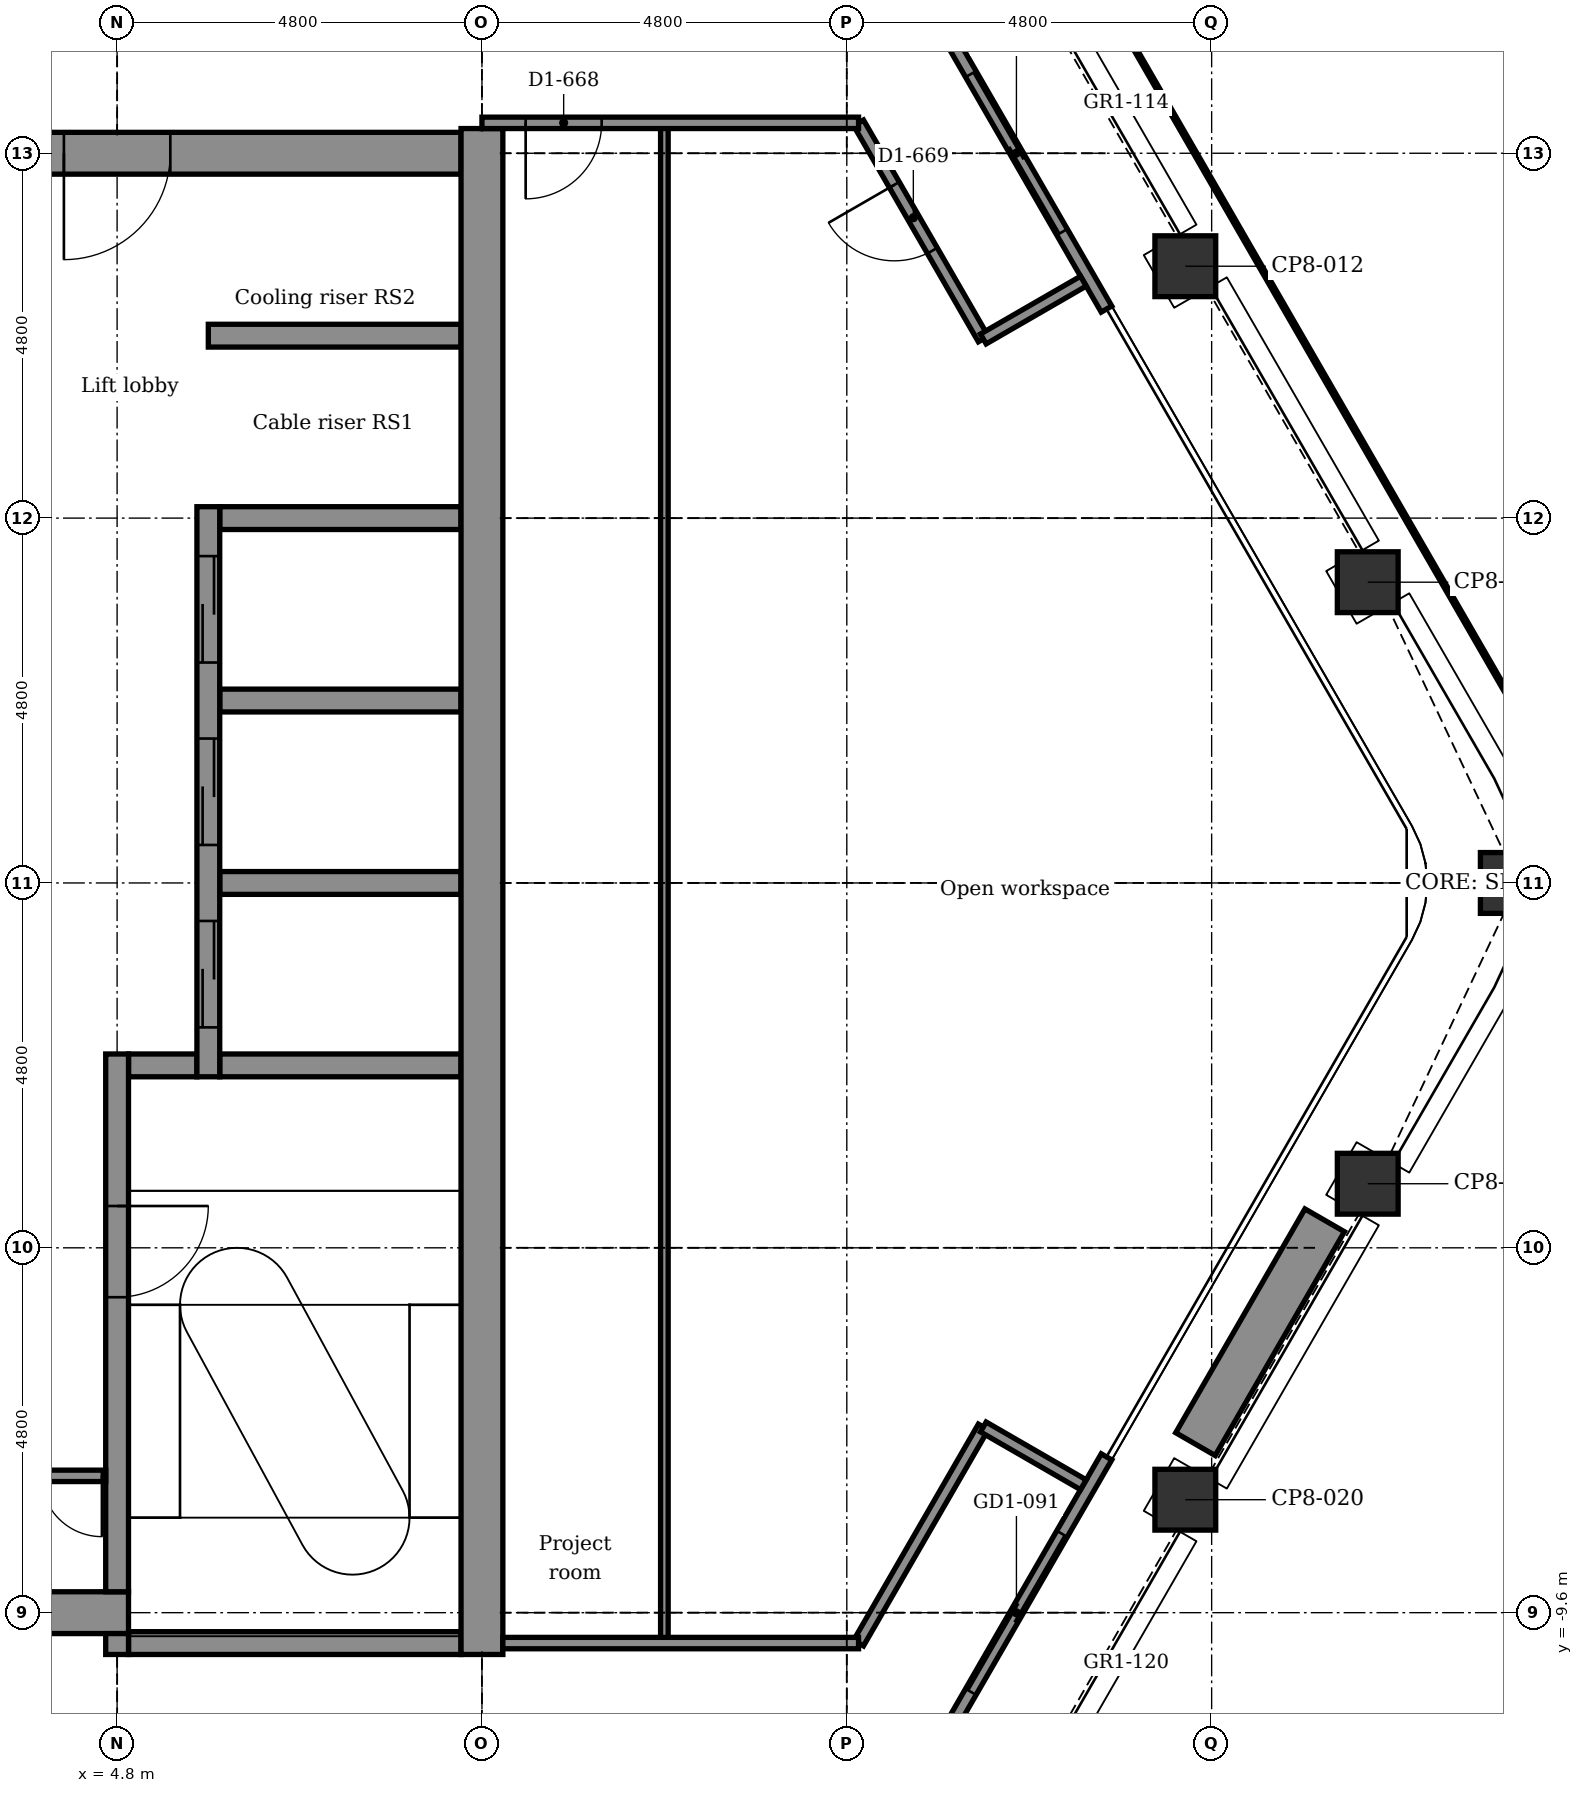
"""IFC4 building model, lengths in metres.
Left out: names, types, materials, properties, quantities, classifications, styles, units other than length and angle.
Written with IfcOpenShell. Run it as: python <this file> out.ifc"""

import sys

from ifc_helpers import new_model, si_unit, direction, frame, frame_2d, origin, origin_2d, place, context, subcontext, project, spatial, rectangle, extrude, element, fill, save


model = new_model("IFC4")
c1 = context("Model", 3, precision=1e-05, world=origin(), true_north=direction((0.0, 1.0)))
c2 = subcontext(c1, "Body", "Model", "MODEL_VIEW")
j1 = project(units=[si_unit("LENGTHUNIT", "METRE"), si_unit("PLANEANGLEUNIT", "RADIAN")], contexts=[c1])
p1 = place(None, origin())
s1 = spatial("IfcSite", under=j1, at=p1, CompositionType="ELEMENT")
p2 = place(p1, origin())
s2 = spatial("IfcBuilding", under=s1, at=p2, CompositionType="ELEMENT")
p3 = place(p2, frame((0.0, 0.0, 238.4)))
s3 = spatial("IfcBuildingStorey", under=s2, at=p3, CompositionType="ELEMENT", Elevation=238.4)
for number, where, z_axis, x_axis in (
    (1, (18.854, 8.114, -0.15), (0.0, 0.0, 1.0), (0.866, 0.5, 0.0)),
    (2, (21.254, 3.957, -0.15), (0.0, 0.0, 1.0), (0.866, 0.5, 0.0)),
    (3, (23.136, 0.0, -0.15), (0.0, 0.0, 1.0), (1.0, 0.0, 0.0)),
    (4, (21.254, -3.957, -0.15), (0.0, 0.0, 1.0), (0.5, 0.866, 0.0)),
    (5, (18.854, -8.114, -0.15), (0.0, 0.0, 1.0), (0.5, 0.866, 0.0)),
):
    element("IfcColumn", number, at=place(p3, frame(where, z_axis=z_axis, x_axis=x_axis)), inside=s3, PredefinedType="COLUMN", context=c2, shape_type="SweptSolid", body=[
        extrude(rectangle(XDim=0.8, YDim=0.8, at=origin_2d()), origin(), (0.0, 0.0, 1.0), 3.9),
    ])
p4 = place(p3, frame((4.95, -10.0, -0.15), z_axis=(0.0, 0.0, 1.0), x_axis=(1.0, 0.0, 0.0)))
e6 = element("IfcWall", 6, at=p4, inside=s3, PredefinedType="STANDARD", context=c2, shape_type="SweptSolid", body=[
    extrude(rectangle(XDim=4.375, YDim=0.3, at=frame_2d((2.188, 0.0))), origin(), (0.0, 0.0, 1.0), 3.9),
])
p5 = place(p3, frame((-5.25, -9.6, -0.15), z_axis=(0.0, 0.0, 1.0), x_axis=(1.0, 0.0, 0.0)))
e7 = element("IfcWall", 7, at=p5, inside=s3, PredefinedType="SHEAR", context=c2, shape_type="SweptSolid", body=[
    extrude(rectangle(XDim=10.2, YDim=0.55, at=frame_2d((5.1, 0.0))), origin(), (0.0, 0.0, 1.0), 3.9),
])
p6 = place(p5, frame((0.6, 0.0, 0.15)))
e8 = element("IfcOpeningElement", 8, at=p6, cuts=e7, PredefinedType="OPENING", context=c2, shape_type="SweptSolid", body=[
    extrude(rectangle(XDim=0.9, YDim=2.1, at=frame_2d((0.45, 1.05))), frame((0.0, 0.285, 0.0), z_axis=(0.0, -1.0, 0.0), x_axis=(1.0, 0.0, 0.0)), (0.0, 0.0, 1.0), 0.57),
])
p7 = place(p3, frame((4.95, -2.4, -0.15), z_axis=(0.0, 0.0, 1.0), x_axis=(1.0, 0.0, 0.0)))
e9 = element("IfcWall", 9, at=p7, inside=s3, PredefinedType="STANDARD", context=c2, shape_type="SweptSolid", body=[
    extrude(rectangle(XDim=0.9, YDim=0.3, at=frame_2d((0.45, 0.0))), origin(), (0.0, 0.0, 1.0), 3.9),
])
for number, where, z_axis, x_axis in (
    (10, (6.15, -2.4, -0.15), (0.0, 0.0, 1.0), (1.0, 0.0, 0.0)),
    (11, (6.15, 0.0, -0.15), (0.0, 0.0, 1.0), (1.0, 0.0, 0.0)),
    (12, (6.15, 2.4, -0.15), (0.0, 0.0, 1.0), (1.0, 0.0, 0.0)),
    (13, (6.15, 4.8, -0.15), (0.0, 0.0, 1.0), (1.0, 0.0, 0.0)),
):
    element("IfcWall", number, at=place(p3, frame(where, z_axis=z_axis, x_axis=x_axis)), inside=s3, PredefinedType="STANDARD", context=c2, shape_type="SweptSolid", body=[
        extrude(rectangle(XDim=3.175, YDim=0.3, at=frame_2d((1.587, 0.0))), origin(), (0.0, 0.0, 1.0), 3.9),
    ])
p8 = place(p3, frame((6.0, 7.2, -0.15), z_axis=(0.0, 0.0, 1.0), x_axis=(1.0, 0.0, 0.0)))
e14 = element("IfcWall", 14, at=p8, inside=s3, PredefinedType="STANDARD", context=c2, shape_type="SweptSolid", body=[
    extrude(rectangle(XDim=3.325, YDim=0.3, at=frame_2d((1.663, 0.0))), origin(), (0.0, 0.0, 1.0), 3.9),
])
p9 = place(p3, frame((-5.25, 9.6, -0.15), z_axis=(0.0, 0.0, 1.0), x_axis=(1.0, 0.0, 0.0)))
e15 = element("IfcWall", 15, at=p9, inside=s3, PredefinedType="SHEAR", context=c2, shape_type="SweptSolid", body=[
    extrude(rectangle(XDim=14.575, YDim=0.55, at=frame_2d((7.288, 0.0))), origin(), (0.0, 0.0, 1.0), 3.9),
])
p10 = place(p9, frame((9.35, 0.0, 0.15)))
e16 = element("IfcOpeningElement", 16, at=p10, cuts=e15, PredefinedType="OPENING", context=c2, shape_type="SweptSolid", body=[
    extrude(rectangle(XDim=1.4, YDim=2.1, at=frame_2d((0.7, 1.05))), frame((0.0, 0.285, 0.0), z_axis=(0.0, -1.0, 0.0), x_axis=(1.0, 0.0, 0.0)), (0.0, 0.0, 1.0), 0.57),
])
p11 = place(p3, frame((4.8, -10.15, -0.15), z_axis=(0.0, 0.0, 1.0), x_axis=(0.0, 1.0, 0.0)))
e17 = element("IfcWall", 17, at=p11, inside=s3, PredefinedType="STANDARD", context=c2, shape_type="SweptSolid", body=[
    extrude(rectangle(XDim=0.275, YDim=0.3, at=frame_2d((0.137, 0.0))), origin(), (0.0, 0.0, 1.0), 3.9),
])
p12 = place(p3, frame((4.8, -9.325, -0.15), z_axis=(0.0, 0.0, 1.0), x_axis=(0.0, 1.0, 0.0)))
e18 = element("IfcWall", 18, at=p12, inside=s3, PredefinedType="STANDARD", context=c2, shape_type="SweptSolid", body=[
    extrude(rectangle(XDim=7.075, YDim=0.3, at=frame_2d((3.538, 0.0))), origin(), (0.0, 0.0, 1.0), 3.9),
])
p13 = place(p12, frame((3.875, 0.0, 0.15)))
e19 = element("IfcOpeningElement", 19, at=p13, cuts=e18, PredefinedType="OPENING", context=c2, shape_type="SweptSolid", body=[
    extrude(rectangle(XDim=1.2, YDim=2.1, at=frame_2d((0.6, 1.05))), frame((0.0, 0.16, 0.0), z_axis=(0.0, -1.0, 0.0), x_axis=(1.0, 0.0, 0.0)), (0.0, 0.0, 1.0), 0.32),
])
p14 = place(p3, frame((6.0, -2.55, -0.15), z_axis=(0.0, 0.0, 1.0), x_axis=(0.0, 1.0, 0.0)))
e20 = element("IfcWall", 20, at=p14, inside=s3, PredefinedType="STANDARD", context=c2, shape_type="SweptSolid", body=[
    extrude(rectangle(XDim=7.5, YDim=0.3, at=frame_2d((3.75, 0.0))), origin(), (0.0, 0.0, 1.0), 3.9),
])
p15 = place(p14, frame((0.65, 0.0, 0.15)))
e21 = element("IfcOpeningElement", 21, at=p15, cuts=e20, PredefinedType="OPENING", context=c2, shape_type="SweptSolid", body=[
    extrude(rectangle(XDim=1.4, YDim=2.1, at=frame_2d((0.7, 1.05))), frame((0.0, 0.16, 0.0), z_axis=(0.0, -1.0, 0.0), x_axis=(1.0, 0.0, 0.0)), (0.0, 0.0, 1.0), 0.32),
])
p16 = place(p14, frame((3.05, 0.0, 0.15)))
e22 = element("IfcOpeningElement", 22, at=p16, cuts=e20, PredefinedType="OPENING", context=c2, shape_type="SweptSolid", body=[
    extrude(rectangle(XDim=1.4, YDim=2.1, at=frame_2d((0.7, 1.05))), frame((0.0, 0.16, 0.0), z_axis=(0.0, -1.0, 0.0), x_axis=(1.0, 0.0, 0.0)), (0.0, 0.0, 1.0), 0.32),
])
p17 = place(p14, frame((5.45, 0.0, 0.15)))
e23 = element("IfcOpeningElement", 23, at=p17, cuts=e20, PredefinedType="OPENING", context=c2, shape_type="SweptSolid", body=[
    extrude(rectangle(XDim=1.4, YDim=2.1, at=frame_2d((0.7, 1.05))), frame((0.0, 0.16, 0.0), z_axis=(0.0, -1.0, 0.0), x_axis=(1.0, 0.0, 0.0)), (0.0, 0.0, 1.0), 0.32),
])
p18 = place(p3, frame((9.6, -10.15, -0.15), z_axis=(0.0, 0.0, 1.0), x_axis=(0.0, 1.0, 0.0)))
e24 = element("IfcWall", 24, at=p18, inside=s3, PredefinedType="SHEAR", context=c2, shape_type="SweptSolid", body=[
    extrude(rectangle(XDim=20.075, YDim=0.55, at=frame_2d((10.038, 0.0))), origin(), (0.0, 0.0, 1.0), 3.9),
])
p19 = place(p3, frame((15.447, 11.655, 0.0), z_axis=(0.0, 0.0, 1.0), x_axis=(0.499978080042, -0.866038058908, 0.0)))
e25 = element("IfcWall", 25, at=p19, inside=s3, PredefinedType="PARTITIONING", context=c2, shape_type="SweptSolid", body=[
    extrude(rectangle(XDim=4.74, YDim=0.16, at=frame_2d((2.37, 0.0))), origin(), (0.0, 0.0, 1.0), 3.75),
])
p20 = place(p19, frame((1.17, 0.0, 0.0)))
e26 = element("IfcOpeningElement", 26, at=p20, cuts=e25, PredefinedType="OPENING", context=c2, shape_type="SweptSolid", body=[
    extrude(rectangle(XDim=2.4, YDim=2.4, at=frame_2d((1.2, 1.2))), frame((0.0, 0.09, 0.0), z_axis=(0.0, -1.0, 0.0), x_axis=(1.0, 0.0, 0.0)), (0.0, 0.0, 1.0), 0.18),
])
p21 = place(p3, frame((17.817, -7.55, 0.0), z_axis=(0.0, 0.0, 1.0), x_axis=(-0.499978080042, -0.866038058908, 0.0)))
e27 = element("IfcWall", 27, at=p21, inside=s3, PredefinedType="PARTITIONING", context=c2, shape_type="SweptSolid", body=[
    extrude(rectangle(XDim=4.74, YDim=0.16, at=frame_2d((2.37, 0.0))), origin(), (0.0, 0.0, 1.0), 3.75),
])
p22 = place(p21, frame((1.17, 0.0, 0.0)))
e28 = element("IfcOpeningElement", 28, at=p22, cuts=e27, PredefinedType="OPENING", context=c2, shape_type="SweptSolid", body=[
    extrude(rectangle(XDim=2.4, YDim=2.4, at=frame_2d((1.2, 1.2))), frame((0.0, 0.09, 0.0), z_axis=(0.0, -1.0, 0.0), x_axis=(1.0, 0.0, 0.0)), (0.0, 0.0, 1.0), 0.18),
])
p23 = place(p3, frame((20.687, -4.438, 0.0), z_axis=(0.0, 0.0, 1.0), x_axis=(-0.500008388397, -0.866020560687, 0.0)))
e29 = element("IfcWall", 29, at=p23, inside=s3, PredefinedType="USERDEFINED", context=c2, shape_type="SweptSolid", body=[
    extrude(rectangle(XDim=3.4, YDim=0.6, at=frame_2d((1.7, 0.0))), origin(), (0.0, 0.0, 1.0), 0.7),
])
p24 = place(p3, frame((12.0, -10.0, 0.0), z_axis=(0.0, 0.0, 1.0), x_axis=(0.0, 1.0, 0.0)))
e30 = element("IfcWall", 30, at=p24, inside=s3, PredefinedType="PARTITIONING", context=c2, shape_type="SweptSolid", body=[
    extrude(rectangle(XDim=20.0, YDim=0.1, at=frame_2d((10.0, 0.0))), origin(), (0.0, 0.0, 1.0), 3.75),
])
p25 = place(p3, frame((14.555, 10.0, 0.0), z_axis=(0.0, 0.0, 1.0), x_axis=(0.499954196102, -0.866051847062, 0.0)))
e31 = element("IfcWall", 31, at=p25, inside=s3, PredefinedType="PARTITIONING", context=c2, shape_type="SweptSolid", body=[
    extrude(rectangle(XDim=3.283, YDim=0.15, at=frame_2d((1.642, 0.0))), origin(), (0.0, 0.0, 1.0), 3.75),
])
p26 = place(p25, frame((0.941, 0.0, 0.0)))
e32 = element("IfcOpeningElement", 32, at=p26, cuts=e31, PredefinedType="OPENING", context=c2, shape_type="SweptSolid", body=[
    extrude(rectangle(XDim=1.0, YDim=2.1, at=frame_2d((0.5, 1.05))), frame((0.0, 0.085, 0.0), z_axis=(0.0, -1.0, 0.0), x_axis=(1.0, 0.0, 0.0)), (0.0, 0.0, 1.0), 0.17),
])
p27 = place(p3, frame((14.555, -10.0, 0.0), z_axis=(0.0, 0.0, 1.0), x_axis=(0.499954196102, 0.866051847062, 0.0)))
e33 = element("IfcWall", 33, at=p27, inside=s3, PredefinedType="PARTITIONING", context=c2, shape_type="SweptSolid", body=[
    extrude(rectangle(XDim=3.283, YDim=0.15, at=frame_2d((1.642, 0.0))), origin(), (0.0, 0.0, 1.0), 3.75),
])
for number, where, z_axis, x_axis in (
    (34, (16.196, -7.157, 0.0), (0.0, 0.0, 1.0), (0.866, -0.5, 0.0)),
    (35, (16.196, 7.157, 0.0), (0.0, 0.0, 1.0), (0.866, 0.5, 0.0)),
):
    element("IfcWall", number, at=place(p3, frame(where, z_axis=z_axis, x_axis=x_axis)), inside=s3, PredefinedType="PARTITIONING", context=c2, shape_type="SweptSolid", body=[
        extrude(rectangle(XDim=1.52, YDim=0.15, at=frame_2d((0.76, 0.0))), origin(), (0.0, 0.0, 1.0), 3.75),
    ])
p28 = place(p3, frame((9.875, -10.0, 0.0), z_axis=(0.0, 0.0, 1.0), x_axis=(1.0, 0.0, 0.0)))
e36 = element("IfcWall", 36, at=p28, inside=s3, PredefinedType="PARTITIONING", context=c2, shape_type="SweptSolid", body=[
    extrude(rectangle(XDim=4.68, YDim=0.15, at=frame_2d((2.34, 0.0))), origin(), (0.0, 0.0, 1.0), 3.75),
])
p29 = place(p3, frame((3.75, -7.8, 0.0), z_axis=(0.0, 0.0, 1.0), x_axis=(1.0, 0.0, 0.0)))
e37 = element("IfcWall", 37, at=p29, inside=s3, PredefinedType="PARTITIONING", context=c2, shape_type="SweptSolid", body=[
    extrude(rectangle(XDim=0.9, YDim=0.15, at=frame_2d((0.45, 0.0))), origin(), (0.0, 0.0, 1.0), 3.75),
])
p30 = place(p29, frame((0.05, 0.0, 0.0)))
e38 = element("IfcOpeningElement", 38, at=p30, cuts=e37, PredefinedType="OPENING", context=c2, shape_type="SweptSolid", body=[
    extrude(rectangle(XDim=0.8, YDim=2.1, at=frame_2d((0.4, 1.05))), frame((0.0, 0.085, 0.0), z_axis=(0.0, -1.0, 0.0), x_axis=(1.0, 0.0, 0.0)), (0.0, 0.0, 1.0), 0.17),
])
p31 = place(p3, frame((9.6, 10.0, 0.0), z_axis=(0.0, 0.0, 1.0), x_axis=(1.0, 0.0, 0.0)))
e39 = element("IfcWall", 39, at=p31, inside=s3, PredefinedType="PARTITIONING", context=c2, shape_type="SweptSolid", body=[
    extrude(rectangle(XDim=4.955, YDim=0.15, at=frame_2d((2.477, 0.0))), origin(), (0.0, 0.0, 1.0), 3.75),
])
p32 = place(p31, frame((0.575, 0.0, 0.0)))
e40 = element("IfcOpeningElement", 40, at=p32, cuts=e39, PredefinedType="OPENING", context=c2, shape_type="SweptSolid", body=[
    extrude(rectangle(XDim=1.0, YDim=2.1, at=frame_2d((0.5, 1.05))), frame((0.0, 0.085, 0.0), z_axis=(0.0, -1.0, 0.0), x_axis=(1.0, 0.0, 0.0)), (0.0, 0.0, 1.0), 0.17),
])
p33 = place(p20, origin())
e41 = element("IfcDoor", 41, at=p33, inside=s3, OperationType="DOUBLE_DOOR_SLIDING", PredefinedType="DOOR", context=c2, shape_type="SweptSolid", body=[
    extrude(rectangle(XDim=2.4, YDim=2.4, at=frame_2d((1.2, 1.2))), frame((0.0, 0.025, 0.0), z_axis=(0.0, -1.0, 0.0), x_axis=(1.0, 0.0, 0.0)), (0.0, 0.0, 1.0), 0.05),
])
fill(e26, e41)
p34 = place(p22, origin())
e42 = element("IfcDoor", 42, at=p34, inside=s3, OperationType="DOUBLE_DOOR_SLIDING", PredefinedType="DOOR", context=c2, shape_type="SweptSolid", body=[
    extrude(rectangle(XDim=2.4, YDim=2.4, at=frame_2d((1.2, 1.2))), frame((0.0, 0.025, 0.0), z_axis=(0.0, -1.0, 0.0), x_axis=(1.0, 0.0, 0.0)), (0.0, 0.0, 1.0), 0.05),
])
fill(e28, e42)
p35 = place(p30, frame((0.8, 0.0, 0.0), z_axis=(0.0, 0.0, 1.0), x_axis=(-1.0, 0.0, 0.0)))
e43 = element("IfcDoor", 43, at=p35, inside=s3, OperationType="SINGLE_SWING_RIGHT", PredefinedType="DOOR", context=c2, shape_type="SweptSolid", body=[
    extrude(rectangle(XDim=0.8, YDim=2.1, at=frame_2d((0.4, 1.05))), frame((0.0, 0.025, 0.0), z_axis=(0.0, -1.0, 0.0), x_axis=(1.0, 0.0, 0.0)), (0.0, 0.0, 1.0), 0.05),
])
fill(e38, e43)
p36 = place(p32, frame((1.0, 0.0, 0.0), z_axis=(0.0, 0.0, 1.0), x_axis=(-1.0, 0.0, 0.0)))
e44 = element("IfcDoor", 44, at=p36, inside=s3, OperationType="SINGLE_SWING_LEFT", PredefinedType="DOOR", context=c2, shape_type="SweptSolid", body=[
    extrude(rectangle(XDim=1.0, YDim=2.1, at=frame_2d((0.5, 1.05))), frame((0.0, 0.025, 0.0), z_axis=(0.0, -1.0, 0.0), x_axis=(1.0, 0.0, 0.0)), (0.0, 0.0, 1.0), 0.05),
])
fill(e40, e44)
p37 = place(p26, frame((1.0, 0.0, 0.0), z_axis=(0.0, 0.0, 1.0), x_axis=(-1.0, 0.0, 0.0)))
e45 = element("IfcDoor", 45, at=p37, inside=s3, OperationType="SINGLE_SWING_LEFT", PredefinedType="DOOR", context=c2, shape_type="SweptSolid", body=[
    extrude(rectangle(XDim=1.0, YDim=2.1, at=frame_2d((0.5, 1.05))), frame((0.0, 0.025, 0.0), z_axis=(0.0, -1.0, 0.0), x_axis=(1.0, 0.0, 0.0)), (0.0, 0.0, 1.0), 0.05),
])
fill(e32, e45)
p38 = place(p15, origin())
e46 = element("IfcDoor", 46, at=p38, inside=s3, OperationType="DOUBLE_DOOR_SLIDING", PredefinedType="DOOR", context=c2, shape_type="SweptSolid", body=[
    extrude(rectangle(XDim=1.4, YDim=2.1, at=frame_2d((0.7, 1.05))), frame((0.0, 0.025, 0.0), z_axis=(0.0, -1.0, 0.0), x_axis=(1.0, 0.0, 0.0)), (0.0, 0.0, 1.0), 0.05),
])
fill(e21, e46)
p39 = place(p16, origin())
e47 = element("IfcDoor", 47, at=p39, inside=s3, OperationType="DOUBLE_DOOR_SLIDING", PredefinedType="DOOR", context=c2, shape_type="SweptSolid", body=[
    extrude(rectangle(XDim=1.4, YDim=2.1, at=frame_2d((0.7, 1.05))), frame((0.0, 0.025, 0.0), z_axis=(0.0, -1.0, 0.0), x_axis=(1.0, 0.0, 0.0)), (0.0, 0.0, 1.0), 0.05),
])
fill(e22, e47)
p40 = place(p17, origin())
e48 = element("IfcDoor", 48, at=p40, inside=s3, OperationType="DOUBLE_DOOR_SLIDING", PredefinedType="DOOR", context=c2, shape_type="SweptSolid", body=[
    extrude(rectangle(XDim=1.4, YDim=2.1, at=frame_2d((0.7, 1.05))), frame((0.0, 0.025, 0.0), z_axis=(0.0, -1.0, 0.0), x_axis=(1.0, 0.0, 0.0)), (0.0, 0.0, 1.0), 0.05),
])
fill(e23, e48)
p41 = place(p13, frame((1.2, 0.0, 0.0), z_axis=(0.0, 0.0, 1.0), x_axis=(-1.0, 0.0, 0.0)))
e49 = element("IfcDoor", 49, at=p41, inside=s3, OperationType="SINGLE_SWING_RIGHT", PredefinedType="DOOR", context=c2, shape_type="SweptSolid", body=[
    extrude(rectangle(XDim=1.2, YDim=2.1, at=frame_2d((0.6, 1.05))), frame((0.0, 0.025, 0.0), z_axis=(0.0, -1.0, 0.0), x_axis=(1.0, 0.0, 0.0)), (0.0, 0.0, 1.0), 0.05),
])
fill(e19, e49)
p42 = place(p10, frame((1.4, 0.0, 0.0), z_axis=(0.0, 0.0, 1.0), x_axis=(-1.0, 0.0, 0.0)))
e50 = element("IfcDoor", 50, at=p42, inside=s3, OperationType="SINGLE_SWING_LEFT", PredefinedType="DOOR", context=c2, shape_type="SweptSolid", body=[
    extrude(rectangle(XDim=1.4, YDim=2.1, at=frame_2d((0.7, 1.05))), frame((0.0, 0.025, 0.0), z_axis=(0.0, -1.0, 0.0), x_axis=(1.0, 0.0, 0.0)), (0.0, 0.0, 1.0), 0.05),
])
fill(e16, e50)
save(model, sys.argv[1])
